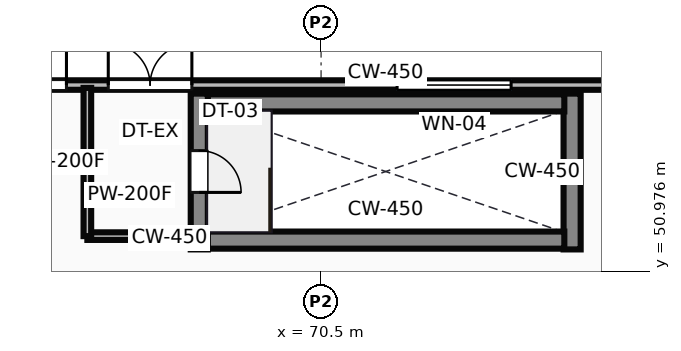
"""IFC4 building model, lengths in metres.
Left out: names, types, materials, properties, quantities, classifications, styles, units other than length and angle.
Written with IfcOpenShell. Run it as: python <this file> out.ifc"""

import sys

from ifc_helpers import new_model, si_unit, direction, frame, frame_2d, origin, place, context, subcontext, project, spatial, rectangle, extrude, source, transform, mapped, element, fill, save


model = new_model("IFC4")
c1 = context("Model", 3, precision=1e-05, world=origin(), true_north=direction((0.0, 1.0)))
c2 = subcontext(c1, "Body", "Model", "MODEL_VIEW")
j1 = project(units=[si_unit("LENGTHUNIT", "METRE"), si_unit("PLANEANGLEUNIT", "RADIAN")], contexts=[c1])
p1 = place(None, origin())
s1 = spatial("IfcSite", under=j1, at=p1, CompositionType="ELEMENT")
p2 = place(p1, origin())
s2 = spatial("IfcBuilding", under=s1, at=p2, CompositionType="ELEMENT")
p3 = place(p2, origin())
s3 = spatial("IfcBuildingStorey", under=s2, at=p3, CompositionType="ELEMENT", Elevation=0.0)
m1 = source(origin(), c2, "Body", "SweptSolid", [
    extrude(rectangle(XDim=82.0, YDim=0.25, at=frame_2d((41.0, 0.0))), origin(), (0.0, 0.0, 1.0), 5.7),
])
p4 = place(p3, frame((82.0, 55.875, 0.0), z_axis=(0.0, 0.0, 1.0), x_axis=(-1.0, 0.0, 0.0)))
e1 = element("IfcWall", 1, at=p4, inside=s3, PredefinedType="STANDARD", context=c2, shape_type="MappedRepresentation", body=[
    mapped(m1, transform((0.0, 0.0, 0.0))),
])
p5 = place(p4, frame((1.8, 0.0, 0.0)))
e2 = element("IfcOpeningElement", 2, at=p5, cuts=e1, PredefinedType="OPENING", context=c2, shape_type="SweptSolid", body=[
    extrude(rectangle(XDim=2.2, YDim=2.4, at=frame_2d((1.1, 1.2))), frame((0.0, 0.135, 0.0), z_axis=(0.0, -1.0, 0.0), x_axis=(1.0, 0.0, 0.0)), (0.0, 0.0, 1.0), 0.27),
])
p6 = place(p4, frame((14.9, 0.0, 0.0)))
e3 = element("IfcOpeningElement", 3, at=p6, cuts=e1, PredefinedType="OPENING", context=c2, shape_type="SweptSolid", body=[
    extrude(rectangle(XDim=2.2, YDim=2.4, at=frame_2d((1.1, 1.2))), frame((0.0, 0.135, 0.0), z_axis=(0.0, -1.0, 0.0), x_axis=(1.0, 0.0, 0.0)), (0.0, 0.0, 1.0), 0.27),
])
p7 = place(p4, frame((18.2, 0.0, 0.0)))
e4 = element("IfcOpeningElement", 4, at=p7, cuts=e1, PredefinedType="OPENING", context=c2, shape_type="SweptSolid", body=[
    extrude(rectangle(XDim=2.2, YDim=2.4, at=frame_2d((1.1, 1.2))), frame((0.0, 0.135, 0.0), z_axis=(0.0, -1.0, 0.0), x_axis=(1.0, 0.0, 0.0)), (0.0, 0.0, 1.0), 0.27),
])
p8 = place(p4, frame((21.4, 0.0, 0.0)))
e5 = element("IfcOpeningElement", 5, at=p8, cuts=e1, PredefinedType="OPENING", context=c2, shape_type="SweptSolid", body=[
    extrude(rectangle(XDim=2.2, YDim=2.4, at=frame_2d((1.1, 1.2))), frame((0.0, 0.135, 0.0), z_axis=(0.0, -1.0, 0.0), x_axis=(1.0, 0.0, 0.0)), (0.0, 0.0, 1.0), 0.27),
])
p9 = place(p4, frame((24.6, 0.0, 0.0)))
e6 = element("IfcOpeningElement", 6, at=p9, cuts=e1, PredefinedType="OPENING", context=c2, shape_type="SweptSolid", body=[
    extrude(rectangle(XDim=2.2, YDim=2.4, at=frame_2d((1.1, 1.2))), frame((0.0, 0.135, 0.0), z_axis=(0.0, -1.0, 0.0), x_axis=(1.0, 0.0, 0.0)), (0.0, 0.0, 1.0), 0.27),
])
p10 = place(p4, frame((38.0, 0.0, 0.0)))
e7 = element("IfcOpeningElement", 7, at=p10, cuts=e1, PredefinedType="OPENING", context=c2, shape_type="SweptSolid", body=[
    extrude(rectangle(XDim=2.2, YDim=2.4, at=frame_2d((1.1, 1.2))), frame((0.0, 0.135, 0.0), z_axis=(0.0, -1.0, 0.0), x_axis=(1.0, 0.0, 0.0)), (0.0, 0.0, 1.0), 0.27),
])
p11 = place(p4, frame((51.5, 0.0, 0.0)))
e8 = element("IfcOpeningElement", 8, at=p11, cuts=e1, PredefinedType="OPENING", context=c2, shape_type="SweptSolid", body=[
    extrude(rectangle(XDim=2.2, YDim=2.4, at=frame_2d((1.1, 1.2))), frame((0.0, 0.135, 0.0), z_axis=(0.0, -1.0, 0.0), x_axis=(1.0, 0.0, 0.0)), (0.0, 0.0, 1.0), 0.27),
])
p12 = place(p4, frame((64.9, 0.0, 0.0)))
e9 = element("IfcOpeningElement", 9, at=p12, cuts=e1, PredefinedType="OPENING", context=c2, shape_type="SweptSolid", body=[
    extrude(rectangle(XDim=2.2, YDim=2.4, at=frame_2d((1.1, 1.2))), frame((0.0, 0.135, 0.0), z_axis=(0.0, -1.0, 0.0), x_axis=(1.0, 0.0, 0.0)), (0.0, 0.0, 1.0), 0.27),
])
p13 = place(p4, frame((78.0, 0.0, 0.0)))
e10 = element("IfcOpeningElement", 10, at=p13, cuts=e1, PredefinedType="OPENING", context=c2, shape_type="SweptSolid", body=[
    extrude(rectangle(XDim=2.2, YDim=2.4, at=frame_2d((1.1, 1.2))), frame((0.0, 0.135, 0.0), z_axis=(0.0, -1.0, 0.0), x_axis=(1.0, 0.0, 0.0)), (0.0, 0.0, 1.0), 0.27),
])
p14 = place(p4, frame((6.5, 0.0, 0.9)))
e11 = element("IfcOpeningElement", 11, at=p14, cuts=e1, PredefinedType="OPENING", context=c2, shape_type="SweptSolid", body=[
    extrude(rectangle(XDim=3.0, YDim=2.4, at=frame_2d((1.5, 1.2))), frame((0.0, 0.135, 0.0), z_axis=(0.0, -1.0, 0.0), x_axis=(1.0, 0.0, 0.0)), (0.0, 0.0, 1.0), 0.27),
])
m2 = source(origin(), c2, "Body", "SweptSolid", [
    extrude(rectangle(XDim=4.1, YDim=0.45, at=frame_2d((2.05, 0.0))), origin(), (0.0, 0.0, 1.0), 5.7),
])
p15 = place(p3, frame((67.295, 51.55, 0.0), z_axis=(0.0, 0.0, 1.0), x_axis=(0.0, 1.0, 0.0)))
e12 = element("IfcWall", 12, at=p15, inside=s3, PredefinedType="SHEAR", context=c2, shape_type="MappedRepresentation", body=[
    mapped(m2, transform((0.0, 0.0, 0.0))),
])
p16 = place(p15, frame((1.5, 0.0, 0.0)))
e13 = element("IfcOpeningElement", 13, at=p16, cuts=e12, PredefinedType="OPENING", context=c2, shape_type="SweptSolid", body=[
    extrude(rectangle(XDim=1.1, YDim=2.15, at=frame_2d((0.55, 1.075))), frame((0.0, 0.235, 0.0), z_axis=(0.0, -1.0, 0.0), x_axis=(1.0, 0.0, 0.0)), (0.0, 0.0, 1.0), 0.47),
])
m3 = source(origin(), c2, "Body", "SweptSolid", [
    extrude(rectangle(XDim=9.4, YDim=0.45, at=frame_2d((4.7, 0.0))), origin(), (0.0, 0.0, 1.0), 5.7),
])
for number, where, z_axis, x_axis in (
    (14, (67.5, 51.795, 0.0), (0.0, 0.0, 1.0), (1.0, 0.0, 0.0)),
    (15, (67.5, 55.405, 0.0), (0.0, 0.0, 1.0), (1.0, 0.0, 0.0)),
):
    element("IfcWall", number, at=place(p3, frame(where, z_axis=z_axis, x_axis=x_axis)), inside=s3, PredefinedType="SHEAR", context=c2, shape_type="MappedRepresentation", body=[
        mapped(m3, transform((0.0, 0.0, 0.0))),
    ])
p17 = place(p3, frame((77.105, 51.55, 0.0), z_axis=(0.0, 0.0, 1.0), x_axis=(0.0, 1.0, 0.0)))
e16 = element("IfcWall", 16, at=p17, inside=s3, PredefinedType="SHEAR", context=c2, shape_type="MappedRepresentation", body=[
    mapped(m2, transform((0.0, 0.0, 0.0))),
])
m4 = source(origin(), c2, "Body", "SweptSolid", [
    extrude(rectangle(XDim=3.9, YDim=0.2, at=frame_2d((1.95, 0.0))), origin(), (0.0, 0.0, 1.0), 5.7),
])
p18 = place(p3, frame((64.35, 51.9, 0.0), z_axis=(0.0, 0.0, 1.0), x_axis=(0.0, 1.0, 0.0)))
e17 = element("IfcWall", 17, at=p18, inside=s3, PredefinedType="PARTITIONING", context=c2, shape_type="MappedRepresentation", body=[
    mapped(m4, transform((0.0, 0.0, 0.0))),
])
m5 = source(origin(), c2, "Body", "SweptSolid", [
    extrude(rectangle(XDim=3.08, YDim=0.2, at=frame_2d((1.54, 0.0))), origin(), (0.0, 0.0, 1.0), 5.7),
])
p19 = place(p3, frame((64.35, 51.9, 0.0), z_axis=(0.0, 0.0, 1.0), x_axis=(1.0, 0.0, 0.0)))
e18 = element("IfcWall", 18, at=p19, inside=s3, PredefinedType="PARTITIONING", context=c2, shape_type="MappedRepresentation", body=[
    mapped(m5, transform((0.0, 0.0, 0.0))),
])
m6 = source(origin(), c2, "Body", "SweptSolid", [
    extrude(rectangle(XDim=2.2, YDim=2.4, at=frame_2d((1.1, 1.2))), frame((0.0, 0.025, 0.0), z_axis=(0.0, -1.0, 0.0), x_axis=(1.0, 0.0, 0.0)), (0.0, 0.0, 1.0), 0.05),
])
p20 = place(p6, frame((2.2, 0.0, 0.0), z_axis=(0.0, 0.0, 1.0), x_axis=(-1.0, 0.0, 0.0)))
e19 = element("IfcDoor", 19, at=p20, inside=s3, OperationType="DOUBLE_DOOR_SINGLE_SWING", PredefinedType="DOOR", context=c2, shape_type="MappedRepresentation", body=[
    mapped(m6, transform((0.0, 0.0, 0.0))),
])
fill(e3, e19)
p21 = place(p7, frame((2.2, 0.0, 0.0), z_axis=(0.0, 0.0, 1.0), x_axis=(-1.0, 0.0, 0.0)))
e20 = element("IfcDoor", 20, at=p21, inside=s3, OperationType="DOUBLE_DOOR_SINGLE_SWING", PredefinedType="DOOR", context=c2, shape_type="MappedRepresentation", body=[
    mapped(m6, transform((0.0, 0.0, 0.0))),
])
fill(e4, e20)
m7 = source(origin(), c2, "Body", "SweptSolid", [
    extrude(rectangle(XDim=3.0, YDim=2.4, at=frame_2d((1.5, 1.2))), frame((0.0, 0.03, 0.0), z_axis=(0.0, -1.0, 0.0), x_axis=(1.0, 0.0, 0.0)), (0.0, 0.0, 1.0), 0.06),
])
p22 = place(p14, origin())
e21 = element("IfcWindow", 21, at=p22, inside=s3, PartitioningType="SINGLE_PANEL", PredefinedType="WINDOW", context=c2, shape_type="MappedRepresentation", body=[
    mapped(m7, transform((0.0, 0.0, 0.0))),
])
fill(e11, e21)
m8 = source(origin(), c2, "Body", "SweptSolid", [
    extrude(rectangle(XDim=1.1, YDim=2.15, at=frame_2d((0.55, 1.075))), frame((0.0, 0.025, 0.0), z_axis=(0.0, -1.0, 0.0), x_axis=(1.0, 0.0, 0.0)), (0.0, 0.0, 1.0), 0.05),
])
p23 = place(p16, origin())
e22 = element("IfcDoor", 22, at=p23, inside=s3, OperationType="SINGLE_SWING_LEFT", PredefinedType="DOOR", context=c2, shape_type="MappedRepresentation", body=[
    mapped(m8, transform((0.0, 0.0, 0.0))),
])
fill(e13, e22)
save(model, sys.argv[1])
